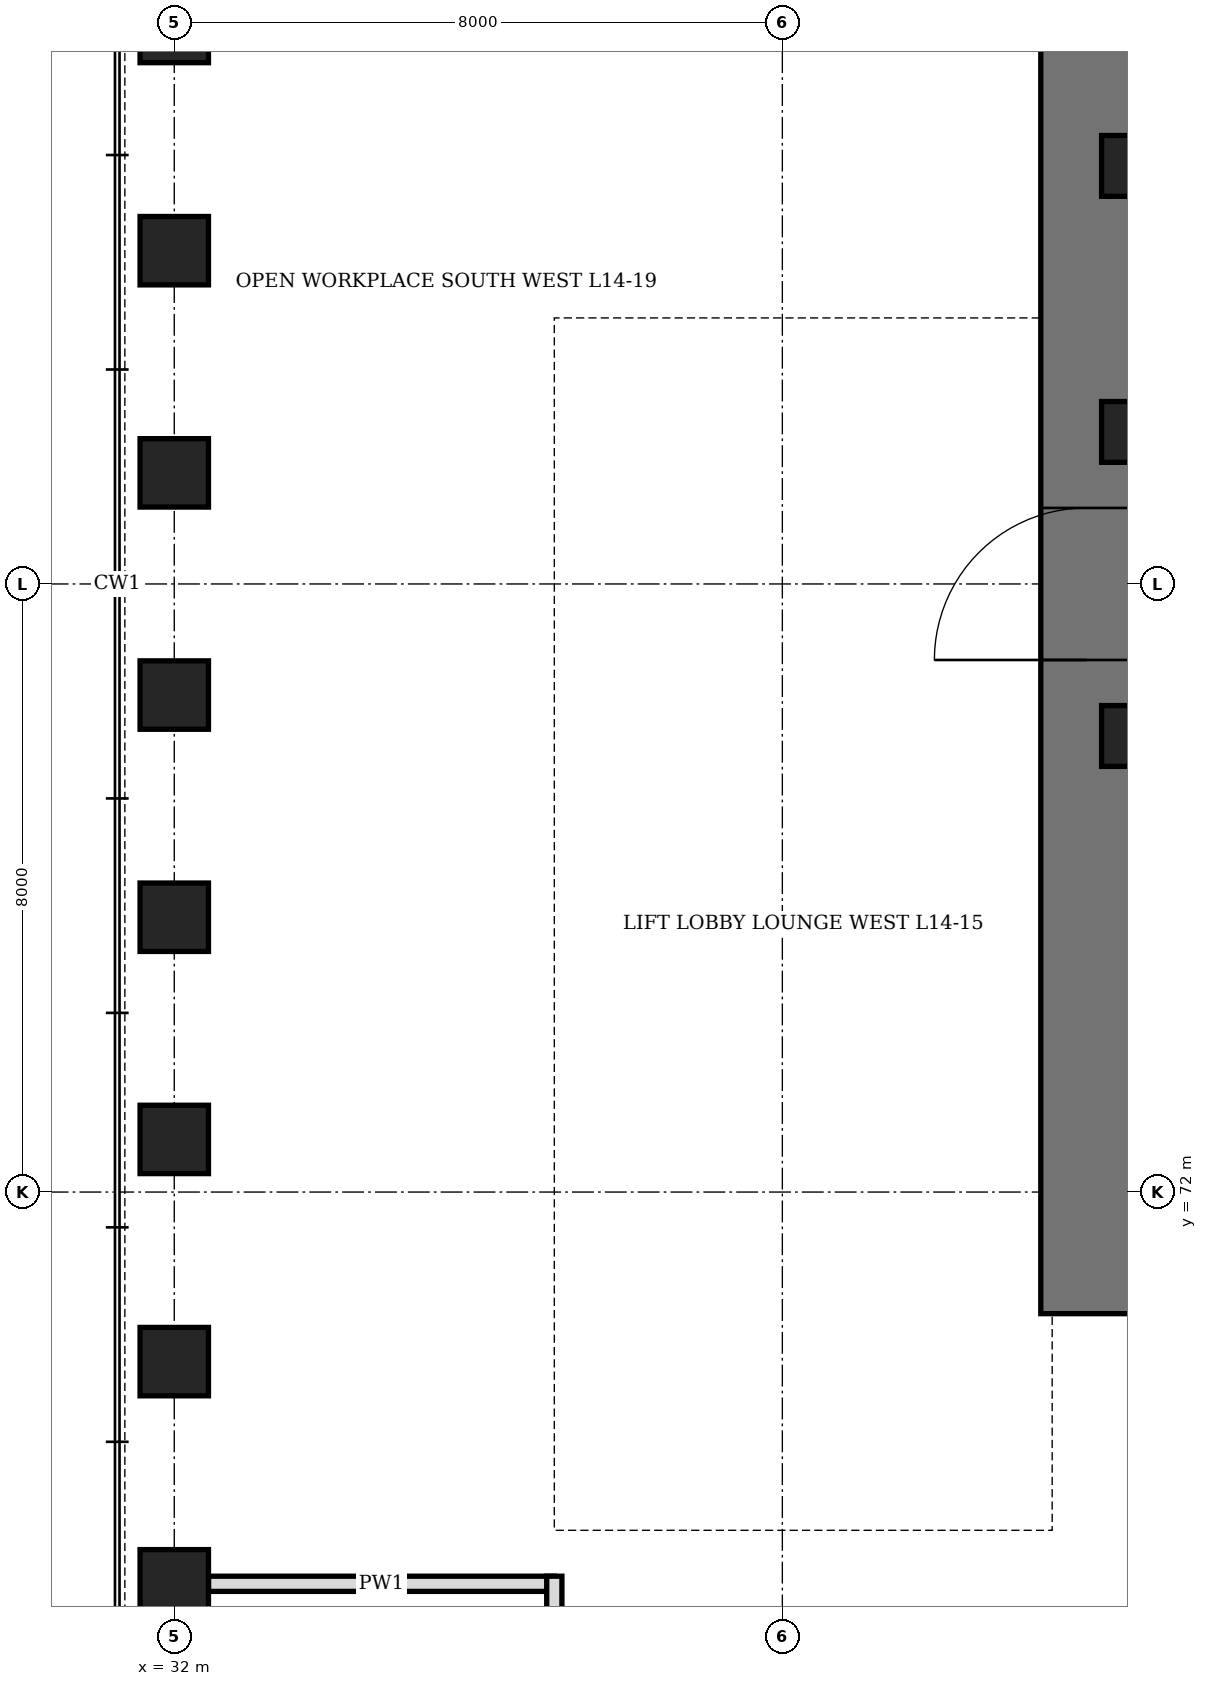
"""IFC4 building model, lengths in metres.
Left out: names, types, materials, properties, quantities, classifications, styles, units other than length and angle.
Written with IfcOpenShell. Run it as: python <this file> out.ifc"""

import sys

from ifc_helpers import new_model, si_unit, direction, frame, frame_2d, origin, origin_2d, place, context, subcontext, project, spatial, rectangle, hollow_rectangle, extrude, element, fill, save


model = new_model("IFC4")
c1 = context("Model", 3, precision=1e-05, world=origin(), true_north=direction((0.0, 1.0)))
c2 = subcontext(c1, "Body", "Model", "MODEL_VIEW")
j1 = project(units=[si_unit("LENGTHUNIT", "METRE"), si_unit("PLANEANGLEUNIT", "RADIAN")], contexts=[c1])
p1 = place(None, origin())
s1 = spatial("IfcSite", under=j1, at=p1, CompositionType="ELEMENT")
p2 = place(p1, origin())
s2 = spatial("IfcBuilding", under=s1, at=p2, CompositionType="ELEMENT")
p3 = place(p2, frame((0.0, 0.0, 68.5)))
s3 = spatial("IfcBuildingStorey", under=s2, at=p3, CompositionType="ELEMENT", Elevation=68.5)
for number, where, z_axis, x_axis in (
    (1, (32.0, 87.308, 0.0), (0.0, 0.0, 1.0), (0.0, 1.0, 0.0)),
    (2, (32.0, 84.385, 0.0), (0.0, 0.0, 1.0), (0.0, 1.0, 0.0)),
    (3, (32.0, 81.461, 0.0), (0.0, 0.0, 1.0), (0.0, 1.0, 0.0)),
    (4, (32.0, 78.539, 0.0), (0.0, 0.0, 1.0), (0.0, 1.0, 0.0)),
    (5, (32.0, 75.615, 0.0), (0.0, 0.0, 1.0), (0.0, 1.0, 0.0)),
    (6, (32.0, 72.692, 0.0), (0.0, 0.0, 1.0), (0.0, 1.0, 0.0)),
    (7, (32.0, 69.769, 0.0), (0.0, 0.0, 1.0), (0.0, 1.0, 0.0)),
    (8, (32.0, 66.846, 0.0), (0.0, 0.0, 1.0), (0.0, 1.0, 0.0)),
):
    element("IfcColumn", number, at=place(p3, frame(where, z_axis=z_axis, x_axis=x_axis)), inside=s3, PredefinedType="COLUMN", context=c2, shape_type="SweptSolid", body=[
        extrude(hollow_rectangle(XDim=0.9, YDim=0.9, WallThickness=0.12, at=origin_2d()), origin(), (0.0, 0.0, 1.0), 4.2),
    ])
p4 = place(p3, frame((44.0, 70.4, 0.0), z_axis=(0.0, 0.0, 1.0), x_axis=(0.0, 1.0, 0.0)))
e9 = element("IfcWall", 9, at=p4, inside=s3, PredefinedType="SHEAR", context=c2, shape_type="SweptSolid", body=[
    extrude(rectangle(XDim=19.2, YDim=1.2, at=frame_2d((9.6, 0.0))), origin(), (0.0, 0.0, 1.0), 4.2),
])
p5 = place(p4, frame((8.6, 0.0, 0.0)))
e10 = element("IfcOpeningElement", 10, at=p5, cuts=e9, PredefinedType="OPENING", context=c2, shape_type="SweptSolid", body=[
    extrude(rectangle(XDim=2.0, YDim=2.4, at=frame_2d((1.0, 1.2))), frame((0.0, 0.61, 0.0), z_axis=(0.0, -1.0, 0.0), x_axis=(1.0, 0.0, 0.0)), (0.0, 0.0, 1.0), 1.22),
])
for number, where, z_axis, x_axis in (
    (11, (44.6, 78.0, 0.0), (0.0, 0.0, 1.0), (1.0, 0.0, 0.0)),
    (12, (44.6, 82.0, 0.0), (0.0, 0.0, 1.0), (1.0, 0.0, 0.0)),
    (13, (44.6, 85.5, 0.0), (0.0, 0.0, 1.0), (1.0, 0.0, 0.0)),
):
    element("IfcColumn", number, at=place(p3, frame(where, z_axis=z_axis, x_axis=x_axis)), inside=s3, PredefinedType="COLUMN", context=c2, shape_type="SweptSolid", body=[
        extrude(hollow_rectangle(XDim=0.8, YDim=0.8, WallThickness=0.1, at=origin_2d()), origin(), (0.0, 0.0, 1.0), 4.2),
    ])
p6 = place(p3, frame((32.45, 66.846, 0.0), z_axis=(0.0, 0.0, 1.0), x_axis=(1.0, 0.0, 0.0)))
e14 = element("IfcWall", 14, at=p6, inside=s3, PredefinedType="PARTITIONING", context=c2, shape_type="SweptSolid", body=[
    extrude(rectangle(XDim=4.55, YDim=0.2, at=frame_2d((2.275, 0.0))), origin(), (0.0, 0.0, 1.0), 3.428),
])
p7 = place(p3, frame((37.0, 61.45, 0.0), z_axis=(0.0, 0.0, 1.0), x_axis=(0.0, 1.0, 0.0)))
e15 = element("IfcWall", 15, at=p7, inside=s3, PredefinedType="PARTITIONING", context=c2, shape_type="SweptSolid", body=[
    extrude(rectangle(XDim=5.496, YDim=0.2, at=frame_2d((2.748, 0.0))), origin(), (0.0, 0.0, 1.0), 4.04),
])
p8 = place(p7, frame((0.511, 0.0, 0.0)))
e16 = element("IfcOpeningElement", 16, at=p8, cuts=e15, PredefinedType="OPENING", context=c2, shape_type="SweptSolid", body=[
    extrude(rectangle(XDim=1.0, YDim=2.1, at=frame_2d((0.5, 1.05))), frame((0.0, 0.11, 0.0), z_axis=(0.0, -1.0, 0.0), x_axis=(1.0, 0.0, 0.0)), (0.0, 0.0, 1.0), 0.22),
])
p9 = place(p5, origin())
e17 = element("IfcDoor", 17, at=p9, inside=s3, OperationType="DOUBLE_DOOR_SINGLE_SWING", PredefinedType="DOOR", context=c2, shape_type="SweptSolid", body=[
    extrude(rectangle(XDim=2.0, YDim=2.4, at=frame_2d((1.0, 1.2))), frame((0.0, 0.35, 0.0), z_axis=(0.0, -1.0, 0.0), x_axis=(1.0, 0.0, 0.0)), (0.0, 0.0, 1.0), 0.7),
])
fill(e10, e17)
save(model, sys.argv[1])
